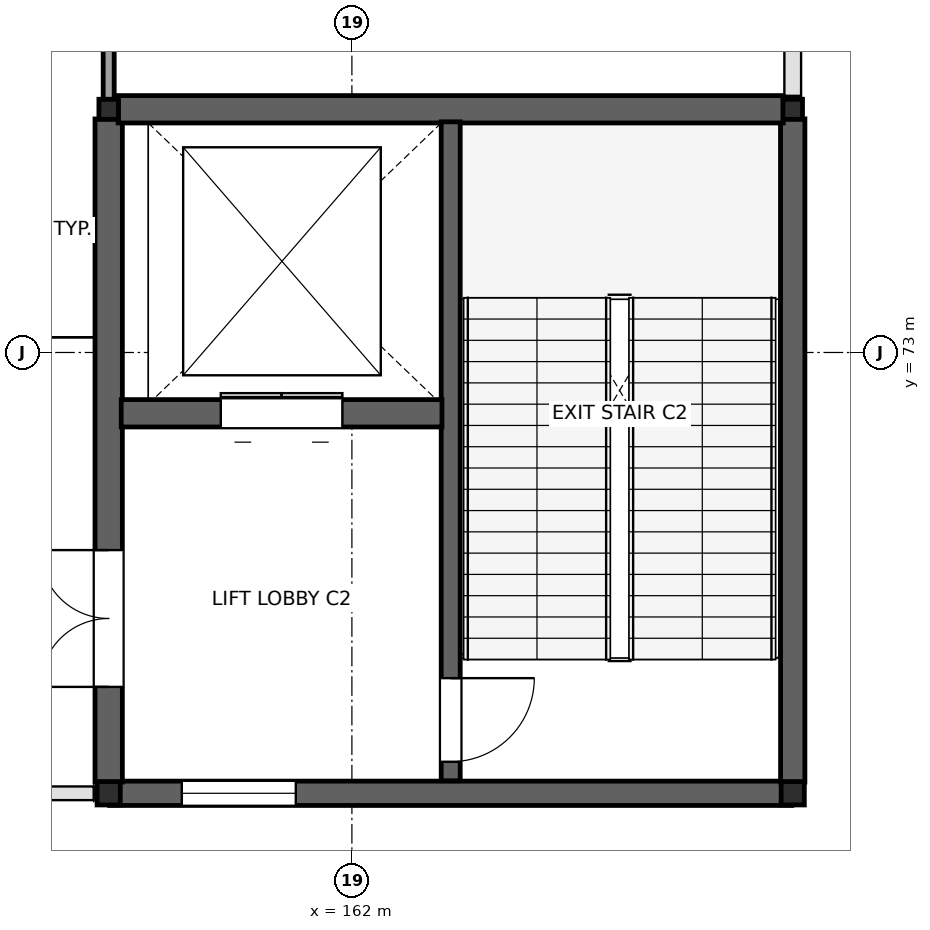
"""IFC4 building model, lengths in metres.
Left out: names, types, materials, properties, quantities, classifications, styles, units other than length and angle.
Written with IfcOpenShell. Run it as: python <this file> out.ifc"""

import sys

from ifc_helpers import new_model, si_unit, direction, frame, frame_2d, origin, origin_2d, place, context, subcontext, project, spatial, rectangle, i_section, extrude, element, fill, save


model = new_model("IFC4")
c1 = context("Model", 3, precision=1e-05, world=origin(), true_north=direction((0.0, 1.0)))
c2 = subcontext(c1, "Body", "Model", "MODEL_VIEW")
j1 = project(units=[si_unit("LENGTHUNIT", "METRE"), si_unit("PLANEANGLEUNIT", "RADIAN")], contexts=[c1])
p1 = place(None, origin())
s1 = spatial("IfcSite", under=j1, at=p1, CompositionType="ELEMENT")
p2 = place(p1, origin())
s2 = spatial("IfcBuilding", under=s1, at=p2, CompositionType="ELEMENT")
p3 = place(p2, frame((0.0, 0.0, 6.0)))
s3 = spatial("IfcBuildingStorey", under=s2, at=p3, CompositionType="ELEMENT", Elevation=6.0)
for number, where, z_axis, x_axis in (
    (1, (158.8, 67.2, 0.0), (0.0, 0.0, 1.0), (1.0, 0.0, 0.0)),
    (2, (167.8, 67.2, 0.0), (0.0, 0.0, 1.0), (1.0, 0.0, 0.0)),
):
    element("IfcColumn", number, at=place(p3, frame(where, z_axis=z_axis, x_axis=x_axis)), inside=s3, PredefinedType="COLUMN", context=c2, shape_type="SweptSolid", body=[
        extrude(i_section(OverallWidth=0.305, OverallDepth=0.307, WebThickness=0.01, FlangeThickness=0.015, at=origin_2d()), origin(), (0.0, 0.0, 1.0), 6.0),
    ])
for number, where, z_axis, x_axis in (
    (3, (158.8, 76.2, 0.0), (0.0, 0.0, 1.0), (1.0, 0.0, 0.0)),
    (4, (167.8, 76.2, 0.0), (0.0, 0.0, 1.0), (1.0, 0.0, 0.0)),
):
    element("IfcColumn", number, at=place(p3, frame(where, z_axis=z_axis, x_axis=x_axis)), inside=s3, PredefinedType="COLUMN", context=c2, shape_type="SweptSolid", body=[
        extrude(i_section(OverallWidth=0.257, OverallDepth=0.264, WebThickness=0.012, FlangeThickness=0.02, at=origin_2d()), origin(), (0.0, 0.0, 1.0), 6.0),
    ])
p4 = place(p3, frame((167.788, 67.2, 0.0), z_axis=(0.0, 0.0, 1.0), x_axis=(-1.0, 0.0, 0.0)))
e5 = element("IfcWall", 5, at=p4, inside=s3, PredefinedType="STANDARD", context=c2, shape_type="SweptSolid", body=[
    extrude(rectangle(XDim=8.976, YDim=0.32, at=frame_2d((4.488, 0.0))), origin(), (0.0, 0.0, 1.0), 5.78),
])
p5 = place(p4, frame((6.526, 0.0, 1.2)))
e6 = element("IfcOpeningElement", 6, at=p5, cuts=e5, PredefinedType="OPENING", context=c2, shape_type="SweptSolid", body=[
    extrude(rectangle(XDim=1.5, YDim=1.8, at=frame_2d((0.75, 0.9))), frame((0.0, 0.17, 0.0), z_axis=(0.0, -1.0, 0.0), x_axis=(1.0, 0.0, 0.0)), (0.0, 0.0, 1.0), 0.34),
])
p6 = place(p3, frame((167.8, 76.074, 0.0), z_axis=(0.0, 0.0, 1.0), x_axis=(0.0, -1.0, 0.0)))
e7 = element("IfcWall", 7, at=p6, inside=s3, PredefinedType="STANDARD", context=c2, shape_type="SweptSolid", body=[
    extrude(rectangle(XDim=8.727, YDim=0.32, at=frame_2d((4.364, 0.0))), origin(), (0.0, 0.0, 1.0), 5.78),
])
p7 = place(p3, frame((158.8, 67.348, 0.0), z_axis=(0.0, 0.0, 1.0), x_axis=(0.0, 1.0, 0.0)))
e8 = element("IfcWall", 8, at=p7, inside=s3, PredefinedType="SHEAR", context=c2, shape_type="SweptSolid", body=[
    extrude(rectangle(XDim=8.725, YDim=0.36, at=frame_2d((4.363, 0.0))), origin(), (0.0, 0.0, 1.0), 5.78),
])
p8 = place(p7, frame((1.252, 0.0, 0.0)))
e9 = element("IfcOpeningElement", 9, at=p8, cuts=e8, PredefinedType="OPENING", context=c2, shape_type="SweptSolid", body=[
    extrude(rectangle(XDim=1.8, YDim=2.3, at=frame_2d((0.9, 1.15))), frame((0.0, 0.19, 0.0), z_axis=(0.0, -1.0, 0.0), x_axis=(1.0, 0.0, 0.0)), (0.0, 0.0, 1.0), 0.38),
])
p9 = place(p3, frame((158.924, 76.2, 0.0), z_axis=(0.0, 0.0, 1.0), x_axis=(1.0, 0.0, 0.0)))
e10 = element("IfcWall", 10, at=p9, inside=s3, PredefinedType="SHEAR", context=c2, shape_type="SweptSolid", body=[
    extrude(rectangle(XDim=8.752, YDim=0.36, at=frame_2d((4.376, 0.0))), origin(), (0.0, 0.0, 1.0), 5.78),
])
p10 = place(p3, frame((163.3, 76.035, 0.0), z_axis=(0.0, 0.0, 1.0), x_axis=(0.0, -1.0, 0.0)))
e11 = element("IfcWall", 11, at=p10, inside=s3, PredefinedType="SHEAR", context=c2, shape_type="SweptSolid", body=[
    extrude(rectangle(XDim=8.67, YDim=0.25, at=frame_2d((4.335, 0.0))), origin(), (0.0, 0.0, 1.0), 5.78),
])
p11 = place(p10, frame((7.32, 0.0, 0.0)))
e12 = element("IfcOpeningElement", 12, at=p11, cuts=e11, PredefinedType="OPENING", context=c2, shape_type="SweptSolid", body=[
    extrude(rectangle(XDim=1.1, YDim=2.2, at=frame_2d((0.55, 1.1))), frame((0.0, 0.135, 0.0), z_axis=(0.0, -1.0, 0.0), x_axis=(1.0, 0.0, 0.0)), (0.0, 0.0, 1.0), 0.27),
])
p12 = place(p3, frame((158.965, 72.2, 0.0), z_axis=(0.0, 0.0, 1.0), x_axis=(1.0, 0.0, 0.0)))
e13 = element("IfcWall", 13, at=p12, inside=s3, PredefinedType="SHEAR", context=c2, shape_type="SweptSolid", body=[
    extrude(rectangle(XDim=4.22, YDim=0.36, at=frame_2d((2.11, 0.0))), origin(), (0.0, 0.0, 1.0), 5.78),
])
p13 = place(p12, frame((1.31, 0.0, 0.0)))
e14 = element("IfcOpeningElement", 14, at=p13, cuts=e13, PredefinedType="OPENING", context=c2, shape_type="SweptSolid", body=[
    extrude(rectangle(XDim=1.6, YDim=2.4, at=frame_2d((0.8, 1.2))), frame((0.0, 0.19, 0.0), z_axis=(0.0, -1.0, 0.0), x_axis=(1.0, 0.0, 0.0)), (0.0, 0.0, 1.0), 0.38),
])
p14 = place(p3, frame((158.8, 76.327, 0.0), z_axis=(0.0, 0.0, 1.0), x_axis=(0.0, 1.0, 0.0)))
e15 = element("IfcWall", 15, at=p14, inside=s3, PredefinedType="PARTITIONING", context=c2, shape_type="SweptSolid", body=[
    extrude(rectangle(XDim=8.546, YDim=0.145, at=frame_2d((4.273, 0.0))), origin(), (0.0, 0.0, 1.0), 4.55),
])
p15 = place(p5, origin())
e16 = element("IfcWindow", 16, at=p15, inside=s3, PartitioningType="SINGLE_PANEL", PredefinedType="WINDOW", context=c2, shape_type="SweptSolid", body=[
    extrude(rectangle(XDim=1.5, YDim=1.8, at=frame_2d((0.75, 0.9))), frame((0.0, 0.03, 0.0), z_axis=(0.0, -1.0, 0.0), x_axis=(1.0, 0.0, 0.0)), (0.0, 0.0, 1.0), 0.06),
])
fill(e6, e16)
p16 = place(p11, origin())
e17 = element("IfcDoor", 17, at=p16, inside=s3, OperationType="SINGLE_SWING_LEFT", PredefinedType="DOOR", context=c2, shape_type="SweptSolid", body=[
    extrude(rectangle(XDim=1.1, YDim=2.2, at=frame_2d((0.55, 1.1))), frame((0.0, 0.025, 0.0), z_axis=(0.0, -1.0, 0.0), x_axis=(1.0, 0.0, 0.0)), (0.0, 0.0, 1.0), 0.05),
])
fill(e12, e17)
p17 = place(p13, origin())
e18 = element("IfcDoor", 18, at=p17, inside=s3, OperationType="DOUBLE_DOOR_SLIDING", PredefinedType="DOOR", context=c2, shape_type="SweptSolid", body=[
    extrude(rectangle(XDim=1.6, YDim=2.4, at=frame_2d((0.8, 1.2))), frame((0.0, 0.025, 0.0), z_axis=(0.0, -1.0, 0.0), x_axis=(1.0, 0.0, 0.0)), (0.0, 0.0, 1.0), 0.05),
])
fill(e14, e18)
p18 = place(p8, origin())
e19 = element("IfcDoor", 19, at=p18, inside=s3, OperationType="DOUBLE_DOOR_SINGLE_SWING", PredefinedType="DOOR", context=c2, shape_type="SweptSolid", body=[
    extrude(rectangle(XDim=1.8, YDim=2.3, at=frame_2d((0.9, 1.15))), frame((0.0, 0.025, 0.0), z_axis=(0.0, -1.0, 0.0), x_axis=(1.0, 0.0, 0.0)), (0.0, 0.0, 1.0), 0.05),
])
fill(e9, e19)
save(model, sys.argv[1])
